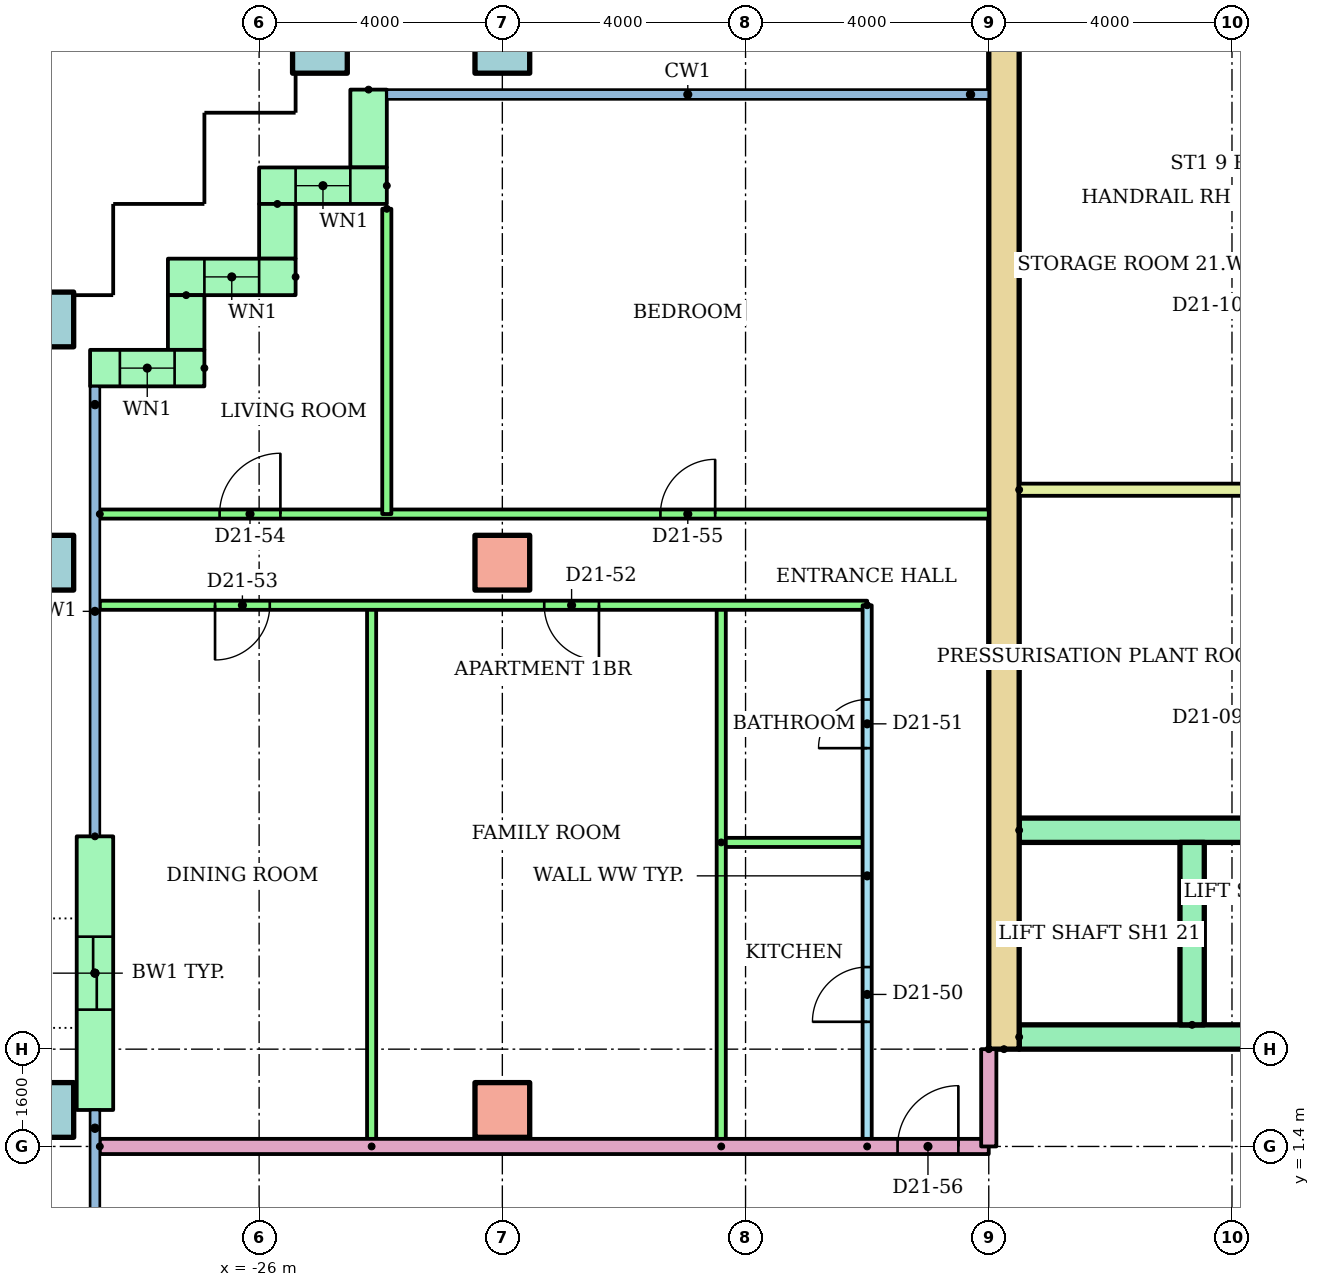
"""IFC4 building model, lengths in metres.
Left out: names, types, materials, properties, quantities, classifications, styles, units other than length and angle.
Written with IfcOpenShell. Run it as: python <this file> out.ifc"""

import sys

from ifc_helpers import new_model, si_unit, direction, frame, frame_2d, origin, origin_2d, place, context, subcontext, project, spatial, rectangle, hollow_rectangle, extrude, element, fill, save


model = new_model("IFC4")
c1 = context("Model", 3, precision=1e-05, world=origin(), true_north=direction((0.0, 1.0)))
c2 = subcontext(c1, "Body", "Model", "MODEL_VIEW")
j1 = project(units=[si_unit("LENGTHUNIT", "METRE"), si_unit("PLANEANGLEUNIT", "RADIAN")], contexts=[c1])
p1 = place(None, origin())
s1 = spatial("IfcSite", under=j1, at=p1, CompositionType="ELEMENT")
p2 = place(p1, origin())
s2 = spatial("IfcBuilding", under=s1, at=p2, CompositionType="ELEMENT")
p3 = place(p2, frame((0.0, 0.0, 83.9)))
s3 = spatial("IfcBuildingStorey", under=s2, at=p3, CompositionType="ELEMENT", Elevation=83.9)
p4 = place(p3, frame((-29.5, 2.0, 0.0)))
e1 = element("IfcColumn", 1, at=p4, inside=s3, PredefinedType="COLUMN", context=c2, shape_type="SweptSolid", body=[
    extrude(hollow_rectangle(XDim=0.9, YDim=0.9, WallThickness=0.045, at=origin_2d()), origin(), (0.0, 0.0, 1.0), 3.2),
])
p5 = place(p3, frame((-22.0, 2.0, 0.0)))
e2 = element("IfcColumn", 2, at=p5, inside=s3, PredefinedType="COLUMN", context=c2, shape_type="SweptSolid", body=[
    extrude(rectangle(XDim=0.9, YDim=0.9, at=origin_2d()), origin(), (0.0, 0.0, 1.0), 3.2),
])
p6 = place(p3, frame((-29.5, 11.0, 0.0)))
e3 = element("IfcColumn", 3, at=p6, inside=s3, PredefinedType="COLUMN", context=c2, shape_type="SweptSolid", body=[
    extrude(hollow_rectangle(XDim=0.9, YDim=0.9, WallThickness=0.045, at=origin_2d()), origin(), (0.0, 0.0, 1.0), 3.2),
])
p7 = place(p3, frame((-22.0, 11.0, 0.0)))
e4 = element("IfcColumn", 4, at=p7, inside=s3, PredefinedType="COLUMN", context=c2, shape_type="SweptSolid", body=[
    extrude(rectangle(XDim=0.9, YDim=0.9, at=origin_2d()), origin(), (0.0, 0.0, 1.0), 3.2),
])
for number, where in (
    (5, (-29.5, 15.0, 0.0)),
    (6, (-25.0, 19.5, 0.0)),
    (7, (-22.0, 19.5, 0.0)),
):
    element("IfcColumn", number, at=place(p3, frame(where)), inside=s3, PredefinedType="COLUMN", context=c2, shape_type="SweptSolid", body=[
        extrude(hollow_rectangle(XDim=0.9, YDim=0.9, WallThickness=0.045, at=origin_2d()), origin(), (0.0, 0.0, 1.0), 3.2),
    ])
p8 = place(p3, frame((-24.2, 18.78, 0.0), z_axis=(0.0, 0.0, 1.0), x_axis=(0.0, -1.0, 0.0)))
e8 = element("IfcWall", 8, at=p8, inside=s3, PredefinedType="STANDARD", context=c2, shape_type="SweptSolid", body=[
    extrude(rectangle(XDim=1.28, YDim=0.6, at=frame_2d((0.64, 0.0))), origin(), (0.0, 0.0, 1.0), 2.92),
])
p9 = place(p3, frame((-23.9, 17.2, 0.0), z_axis=(0.0, 0.0, 1.0), x_axis=(-1.0, 0.0, 0.0)))
e9 = element("IfcWall", 9, at=p9, inside=s3, PredefinedType="STANDARD", context=c2, shape_type="SweptSolid", body=[
    extrude(rectangle(XDim=2.1, YDim=0.6, at=frame_2d((1.05, 0.0))), origin(), (0.0, 0.0, 1.0), 2.92),
])
p10 = place(p9, frame((0.6, 0.0, 0.9)))
e10 = element("IfcOpeningElement", 10, at=p10, cuts=e9, PredefinedType="OPENING", context=c2, shape_type="SweptSolid", body=[
    extrude(rectangle(XDim=0.9, YDim=1.5, at=frame_2d((0.45, 0.75))), frame((0.0, 0.31, 0.0), z_axis=(0.0, -1.0, 0.0), x_axis=(1.0, 0.0, 0.0)), (0.0, 0.0, 1.0), 0.62),
])
p11 = place(p3, frame((-25.7, 16.9, 0.0), z_axis=(0.0, 0.0, 1.0), x_axis=(0.0, -1.0, 0.0)))
e11 = element("IfcWall", 11, at=p11, inside=s3, PredefinedType="STANDARD", context=c2, shape_type="SweptSolid", body=[
    extrude(rectangle(XDim=0.9, YDim=0.6, at=frame_2d((0.45, 0.0))), origin(), (0.0, 0.0, 1.0), 2.92),
])
p12 = place(p3, frame((-25.4, 15.7, 0.0), z_axis=(0.0, 0.0, 1.0), x_axis=(-1.0, 0.0, 0.0)))
e12 = element("IfcWall", 12, at=p12, inside=s3, PredefinedType="STANDARD", context=c2, shape_type="SweptSolid", body=[
    extrude(rectangle(XDim=2.1, YDim=0.6, at=frame_2d((1.05, 0.0))), origin(), (0.0, 0.0, 1.0), 2.92),
])
p13 = place(p12, frame((0.6, 0.0, 0.9)))
e13 = element("IfcOpeningElement", 13, at=p13, cuts=e12, PredefinedType="OPENING", context=c2, shape_type="SweptSolid", body=[
    extrude(rectangle(XDim=0.9, YDim=1.5, at=frame_2d((0.45, 0.75))), frame((0.0, 0.31, 0.0), z_axis=(0.0, -1.0, 0.0), x_axis=(1.0, 0.0, 0.0)), (0.0, 0.0, 1.0), 0.62),
])
p14 = place(p3, frame((-27.2, 15.4, 0.0), z_axis=(0.0, 0.0, 1.0), x_axis=(0.0, -1.0, 0.0)))
e14 = element("IfcWall", 14, at=p14, inside=s3, PredefinedType="STANDARD", context=c2, shape_type="SweptSolid", body=[
    extrude(rectangle(XDim=0.9, YDim=0.6, at=frame_2d((0.45, 0.0))), origin(), (0.0, 0.0, 1.0), 2.92),
])
p15 = place(p3, frame((-26.9, 14.2, 0.0), z_axis=(0.0, 0.0, 1.0), x_axis=(-1.0, 0.0, 0.0)))
e15 = element("IfcWall", 15, at=p15, inside=s3, PredefinedType="STANDARD", context=c2, shape_type="SweptSolid", body=[
    extrude(rectangle(XDim=1.88, YDim=0.6, at=frame_2d((0.94, 0.0))), origin(), (0.0, 0.0, 1.0), 2.92),
])
p16 = place(p15, frame((0.49, 0.0, 0.9)))
e16 = element("IfcOpeningElement", 16, at=p16, cuts=e15, PredefinedType="OPENING", context=c2, shape_type="SweptSolid", body=[
    extrude(rectangle(XDim=0.9, YDim=1.5, at=frame_2d((0.45, 0.75))), frame((0.0, 0.31, 0.0), z_axis=(0.0, -1.0, 0.0), x_axis=(1.0, 0.0, 0.0)), (0.0, 0.0, 1.0), 0.62),
])
p17 = place(p3, frame((-28.7, 6.5, 0.0), z_axis=(0.0, 0.0, 1.0), x_axis=(0.0, -1.0, 0.0)))
e17 = element("IfcWall", 17, at=p17, inside=s3, PredefinedType="STANDARD", context=c2, shape_type="SweptSolid", body=[
    extrude(rectangle(XDim=4.5, YDim=0.6, at=frame_2d((2.25, 0.0))), origin(), (0.0, 0.0, 1.0), 2.92),
])
p18 = place(p17, frame((1.65, 0.0, 0.0)))
e18 = element("IfcOpeningElement", 18, at=p18, cuts=e17, PredefinedType="OPENING", context=c2, shape_type="SweptSolid", body=[
    extrude(rectangle(XDim=1.2, YDim=2.1, at=frame_2d((0.6, 1.05))), frame((0.0, 0.31, 0.0), z_axis=(0.0, -1.0, 0.0), x_axis=(1.0, 0.0, 0.0)), (0.0, 0.0, 1.0), 0.62),
])
p19 = place(p3, frame((-13.75, 3.0, 0.0), z_axis=(0.0, 0.0, 1.0), x_axis=(0.0, 1.0, 0.0)))
e19 = element("IfcWall", 19, at=p19, inside=s3, PredefinedType="SHEAR", context=c2, shape_type="SweptSolid", body=[
    extrude(rectangle(XDim=17.0, YDim=0.5, at=frame_2d((8.5, 0.0))), origin(), (0.0, 0.0, 1.0), 2.92),
])
p20 = place(p3, frame((-13.5, 3.2, 0.0)))
e20 = element("IfcWall", 20, at=p20, inside=s3, PredefinedType="SHEAR", context=c2, shape_type="SweptSolid", body=[
    extrude(rectangle(XDim=27.0, YDim=0.4, at=frame_2d((13.5, 0.0))), origin(), (0.0, 0.0, 1.0), 2.92),
])
p21 = place(p20, frame((6.861, 0.0, 0.0)))
e21 = element("IfcOpeningElement", 21, at=p21, cuts=e20, PredefinedType="OPENING", context=c2, shape_type="SweptSolid", body=[
    extrude(rectangle(XDim=1.1, YDim=2.1, at=frame_2d((0.55, 1.05))), frame((0.0, 0.21, 0.0), z_axis=(0.0, -1.0, 0.0), x_axis=(1.0, 0.0, 0.0)), (0.0, 0.0, 1.0), 0.42),
])
p22 = place(p20, frame((9.906, 0.0, 0.0)))
e22 = element("IfcOpeningElement", 22, at=p22, cuts=e20, PredefinedType="OPENING", context=c2, shape_type="SweptSolid", body=[
    extrude(rectangle(XDim=1.1, YDim=2.1, at=frame_2d((0.55, 1.05))), frame((0.0, 0.21, 0.0), z_axis=(0.0, -1.0, 0.0), x_axis=(1.0, 0.0, 0.0)), (0.0, 0.0, 1.0), 0.42),
])
p23 = place(p20, frame((15.994, 0.0, 0.0)))
e23 = element("IfcOpeningElement", 23, at=p23, cuts=e20, PredefinedType="OPENING", context=c2, shape_type="SweptSolid", body=[
    extrude(rectangle(XDim=1.1, YDim=2.1, at=frame_2d((0.55, 1.05))), frame((0.0, 0.21, 0.0), z_axis=(0.0, -1.0, 0.0), x_axis=(1.0, 0.0, 0.0)), (0.0, 0.0, 1.0), 0.42),
])
p24 = place(p20, frame((19.039, 0.0, 0.0)))
e24 = element("IfcOpeningElement", 24, at=p24, cuts=e20, PredefinedType="OPENING", context=c2, shape_type="SweptSolid", body=[
    extrude(rectangle(XDim=1.1, YDim=2.1, at=frame_2d((0.55, 1.05))), frame((0.0, 0.21, 0.0), z_axis=(0.0, -1.0, 0.0), x_axis=(1.0, 0.0, 0.0)), (0.0, 0.0, 1.0), 0.42),
])
p25 = place(p20, frame((12.6, 0.0, 0.0)))
e25 = element("IfcOpeningElement", 25, at=p25, cuts=e20, PredefinedType="OPENING", context=c2, shape_type="SweptSolid", body=[
    extrude(rectangle(XDim=1.8, YDim=2.1, at=frame_2d((0.9, 1.05))), frame((0.0, 0.21, 0.0), z_axis=(0.0, -1.0, 0.0), x_axis=(1.0, 0.0, 0.0)), (0.0, 0.0, 1.0), 0.42),
])
p26 = place(p3, frame((-13.5, 6.6, 0.0)))
e26 = element("IfcWall", 26, at=p26, inside=s3, PredefinedType="SHEAR", context=c2, shape_type="SweptSolid", body=[
    extrude(rectangle(XDim=11.978, YDim=0.4, at=frame_2d((5.989, 0.0))), origin(), (0.0, 0.0, 1.0), 2.92),
])
p27 = place(p3, frame((-10.656, 3.4, 0.0), z_axis=(0.0, 0.0, 1.0), x_axis=(0.0, 1.0, 0.0)))
e27 = element("IfcWall", 27, at=p27, inside=s3, PredefinedType="SHEAR", context=c2, shape_type="SweptSolid", body=[
    extrude(rectangle(XDim=3.0, YDim=0.4, at=frame_2d((1.5, 0.0))), origin(), (0.0, 0.0, 1.0), 2.92),
])
p28 = place(p3, frame((-13.5, 12.2, 0.0)))
e28 = element("IfcWall", 28, at=p28, inside=s3, PredefinedType="PARTITIONING", context=c2, shape_type="SweptSolid", body=[
    extrude(rectangle(XDim=3.9, YDim=0.2, at=frame_2d((1.95, 0.0))), origin(), (0.0, 0.0, 1.0), 2.92),
])
p29 = place(p3, frame((-16.0, 1.4, 0.0), z_axis=(0.0, 0.0, 1.0), x_axis=(0.0, 1.0, 0.0)))
e29 = element("IfcWall", 29, at=p29, inside=s3, PredefinedType="PARTITIONING", context=c2, shape_type="SweptSolid", body=[
    extrude(rectangle(XDim=8.9, YDim=0.15, at=frame_2d((4.45, 0.0))), origin(), (0.0, 0.0, 1.0), 2.4),
])
p30 = place(p29, frame((2.05, 0.0, 0.0)))
e30 = element("IfcOpeningElement", 30, at=p30, cuts=e29, PredefinedType="OPENING", context=c2, shape_type="SweptSolid", body=[
    extrude(rectangle(XDim=0.9, YDim=2.1, at=frame_2d((0.45, 1.05))), frame((0.0, 0.085, 0.0), z_axis=(0.0, -1.0, 0.0), x_axis=(1.0, 0.0, 0.0)), (0.0, 0.0, 1.0), 0.17),
])
p31 = place(p29, frame((6.55, 0.0, 0.0)))
e31 = element("IfcOpeningElement", 31, at=p31, cuts=e29, PredefinedType="OPENING", context=c2, shape_type="SweptSolid", body=[
    extrude(rectangle(XDim=0.8, YDim=2.1, at=frame_2d((0.4, 1.05))), frame((0.0, 0.085, 0.0), z_axis=(0.0, -1.0, 0.0), x_axis=(1.0, 0.0, 0.0)), (0.0, 0.0, 1.0), 0.17),
])
p32 = place(p3, frame((-18.4, 6.4, 0.0)))
e32 = element("IfcWall", 32, at=p32, inside=s3, PredefinedType="PARTITIONING", context=c2, shape_type="SweptSolid", body=[
    extrude(rectangle(XDim=2.4, YDim=0.15, at=frame_2d((1.2, 0.0))), origin(), (0.0, 0.0, 1.0), 2.4),
])
for number, where, z_axis, x_axis in (
    (33, (-18.4, 1.4, 0.0), (0.0, 0.0, 1.0), (0.0, 1.0, 0.0)),
    (34, (-24.15, 1.4, 0.0), (0.0, 0.0, 1.0), (0.0, 1.0, 0.0)),
):
    element("IfcWall", number, at=place(p3, frame(where, z_axis=z_axis, x_axis=x_axis)), inside=s3, PredefinedType="PARTITIONING", context=c2, shape_type="SweptSolid", body=[
        extrude(rectangle(XDim=8.9, YDim=0.15, at=frame_2d((4.45, 0.0))), origin(), (0.0, 0.0, 1.0), 2.4),
    ])
p33 = place(p3, frame((-16.0, 10.3, 0.0), z_axis=(0.0, 0.0, 1.0), x_axis=(-1.0, 0.0, 0.0)))
e35 = element("IfcWall", 35, at=p33, inside=s3, PredefinedType="PARTITIONING", context=c2, shape_type="SweptSolid", body=[
    extrude(rectangle(XDim=12.62, YDim=0.15, at=frame_2d((6.31, 0.0))), origin(), (0.0, 0.0, 1.0), 2.4),
])
p34 = place(p33, frame((4.411, 0.0, 0.0)))
e36 = element("IfcOpeningElement", 36, at=p34, cuts=e35, PredefinedType="OPENING", context=c2, shape_type="SweptSolid", body=[
    extrude(rectangle(XDim=0.9, YDim=2.1, at=frame_2d((0.45, 1.05))), frame((0.0, 0.085, 0.0), z_axis=(0.0, -1.0, 0.0), x_axis=(1.0, 0.0, 0.0)), (0.0, 0.0, 1.0), 0.17),
])
p35 = place(p33, frame((9.825, 0.0, 0.0)))
e37 = element("IfcOpeningElement", 37, at=p35, cuts=e35, PredefinedType="OPENING", context=c2, shape_type="SweptSolid", body=[
    extrude(rectangle(XDim=0.9, YDim=2.1, at=frame_2d((0.45, 1.05))), frame((0.0, 0.085, 0.0), z_axis=(0.0, -1.0, 0.0), x_axis=(1.0, 0.0, 0.0)), (0.0, 0.0, 1.0), 0.17),
])
p36 = place(p3, frame((-28.62, 11.8, 0.0)))
e38 = element("IfcWall", 38, at=p36, inside=s3, PredefinedType="PARTITIONING", context=c2, shape_type="SweptSolid", body=[
    extrude(rectangle(XDim=14.62, YDim=0.15, at=frame_2d((7.31, 0.0))), origin(), (0.0, 0.0, 1.0), 2.4),
])
p37 = place(p36, frame((1.97, 0.0, 0.0)))
e39 = element("IfcOpeningElement", 39, at=p37, cuts=e38, PredefinedType="OPENING", context=c2, shape_type="SweptSolid", body=[
    extrude(rectangle(XDim=1.0, YDim=2.1, at=frame_2d((0.5, 1.05))), frame((0.0, 0.085, 0.0), z_axis=(0.0, -1.0, 0.0), x_axis=(1.0, 0.0, 0.0)), (0.0, 0.0, 1.0), 0.17),
])
p38 = place(p36, frame((9.22, 0.0, 0.0)))
e40 = element("IfcOpeningElement", 40, at=p38, cuts=e38, PredefinedType="OPENING", context=c2, shape_type="SweptSolid", body=[
    extrude(rectangle(XDim=0.9, YDim=2.1, at=frame_2d((0.45, 1.05))), frame((0.0, 0.085, 0.0), z_axis=(0.0, -1.0, 0.0), x_axis=(1.0, 0.0, 0.0)), (0.0, 0.0, 1.0), 0.17),
])
p39 = place(p3, frame((-23.9, 16.82, 0.0), z_axis=(0.0, 0.0, 1.0), x_axis=(0.0, -1.0, 0.0)))
e41 = element("IfcWall", 41, at=p39, inside=s3, PredefinedType="PARTITIONING", context=c2, shape_type="SweptSolid", body=[
    extrude(rectangle(XDim=5.02, YDim=0.15, at=frame_2d((2.51, 0.0))), origin(), (0.0, 0.0, 1.0), 2.4),
])
p40 = place(p3, frame((-28.62, 1.4, 0.0)))
e42 = element("IfcWall", 42, at=p40, inside=s3, PredefinedType="PARTITIONING", context=c2, shape_type="SweptSolid", body=[
    extrude(rectangle(XDim=14.62, YDim=0.25, at=frame_2d((7.31, 0.0))), origin(), (0.0, 0.0, 1.0), 2.4),
])
p41 = place(p40, frame((13.12, 0.0, 0.0)))
e43 = element("IfcOpeningElement", 43, at=p41, cuts=e42, PredefinedType="OPENING", context=c2, shape_type="SweptSolid", body=[
    extrude(rectangle(XDim=1.0, YDim=2.1, at=frame_2d((0.5, 1.05))), frame((0.0, 0.135, 0.0), z_axis=(0.0, -1.0, 0.0), x_axis=(1.0, 0.0, 0.0)), (0.0, 0.0, 1.0), 0.27),
])
p42 = place(p3, frame((-14.0, 3.0, 0.0), z_axis=(0.0, 0.0, 1.0), x_axis=(0.0, -1.0, 0.0)))
e44 = element("IfcWall", 44, at=p42, inside=s3, PredefinedType="PARTITIONING", context=c2, shape_type="SweptSolid", body=[
    extrude(rectangle(XDim=1.6, YDim=0.25, at=frame_2d((0.8, 0.0))), origin(), (0.0, 0.0, 1.0), 2.4),
])
p43 = place(p10, origin())
e45 = element("IfcWindow", 45, at=p43, inside=s3, PartitioningType="SINGLE_PANEL", PredefinedType="WINDOW", context=c2, shape_type="SweptSolid", body=[
    extrude(rectangle(XDim=0.9, YDim=1.5, at=frame_2d((0.45, 0.75))), frame((0.0, 0.03, 0.0), z_axis=(0.0, -1.0, 0.0), x_axis=(1.0, 0.0, 0.0)), (0.0, 0.0, 1.0), 0.06),
])
fill(e10, e45)
p44 = place(p13, origin())
e46 = element("IfcWindow", 46, at=p44, inside=s3, PartitioningType="SINGLE_PANEL", PredefinedType="WINDOW", context=c2, shape_type="SweptSolid", body=[
    extrude(rectangle(XDim=0.9, YDim=1.5, at=frame_2d((0.45, 0.75))), frame((0.0, 0.03, 0.0), z_axis=(0.0, -1.0, 0.0), x_axis=(1.0, 0.0, 0.0)), (0.0, 0.0, 1.0), 0.06),
])
fill(e13, e46)
p45 = place(p16, origin())
e47 = element("IfcWindow", 47, at=p45, inside=s3, PartitioningType="SINGLE_PANEL", PredefinedType="WINDOW", context=c2, shape_type="SweptSolid", body=[
    extrude(rectangle(XDim=0.9, YDim=1.5, at=frame_2d((0.45, 0.75))), frame((0.0, 0.03, 0.0), z_axis=(0.0, -1.0, 0.0), x_axis=(1.0, 0.0, 0.0)), (0.0, 0.0, 1.0), 0.06),
])
fill(e16, e47)
p46 = place(p30, origin())
e48 = element("IfcDoor", 48, at=p46, inside=s3, OperationType="SINGLE_SWING_LEFT", PredefinedType="DOOR", context=c2, shape_type="SweptSolid", body=[
    extrude(rectangle(XDim=0.9, YDim=2.1, at=frame_2d((0.45, 1.05))), frame((0.0, 0.025, 0.0), z_axis=(0.0, -1.0, 0.0), x_axis=(1.0, 0.0, 0.0)), (0.0, 0.0, 1.0), 0.05),
])
fill(e30, e48)
p47 = place(p31, origin())
e49 = element("IfcDoor", 49, at=p47, inside=s3, OperationType="SINGLE_SWING_LEFT", PredefinedType="DOOR", context=c2, shape_type="SweptSolid", body=[
    extrude(rectangle(XDim=0.8, YDim=2.1, at=frame_2d((0.4, 1.05))), frame((0.0, 0.025, 0.0), z_axis=(0.0, -1.0, 0.0), x_axis=(1.0, 0.0, 0.0)), (0.0, 0.0, 1.0), 0.05),
])
fill(e31, e49)
p48 = place(p34, origin())
e50 = element("IfcDoor", 50, at=p48, inside=s3, OperationType="SINGLE_SWING_LEFT", PredefinedType="DOOR", context=c2, shape_type="SweptSolid", body=[
    extrude(rectangle(XDim=0.9, YDim=2.1, at=frame_2d((0.45, 1.05))), frame((0.0, 0.025, 0.0), z_axis=(0.0, -1.0, 0.0), x_axis=(1.0, 0.0, 0.0)), (0.0, 0.0, 1.0), 0.05),
])
fill(e36, e50)
p49 = place(p35, origin())
e51 = element("IfcDoor", 51, at=p49, inside=s3, OperationType="SINGLE_SWING_RIGHT", PredefinedType="DOOR", context=c2, shape_type="SweptSolid", body=[
    extrude(rectangle(XDim=0.9, YDim=2.1, at=frame_2d((0.45, 1.05))), frame((0.0, 0.025, 0.0), z_axis=(0.0, -1.0, 0.0), x_axis=(1.0, 0.0, 0.0)), (0.0, 0.0, 1.0), 0.05),
])
fill(e37, e51)
p50 = place(p37, origin())
e52 = element("IfcDoor", 52, at=p50, inside=s3, OperationType="SINGLE_SWING_RIGHT", PredefinedType="DOOR", context=c2, shape_type="SweptSolid", body=[
    extrude(rectangle(XDim=1.0, YDim=2.1, at=frame_2d((0.5, 1.05))), frame((0.0, 0.025, 0.0), z_axis=(0.0, -1.0, 0.0), x_axis=(1.0, 0.0, 0.0)), (0.0, 0.0, 1.0), 0.05),
])
fill(e39, e52)
p51 = place(p38, origin())
e53 = element("IfcDoor", 53, at=p51, inside=s3, OperationType="SINGLE_SWING_RIGHT", PredefinedType="DOOR", context=c2, shape_type="SweptSolid", body=[
    extrude(rectangle(XDim=0.9, YDim=2.1, at=frame_2d((0.45, 1.05))), frame((0.0, 0.025, 0.0), z_axis=(0.0, -1.0, 0.0), x_axis=(1.0, 0.0, 0.0)), (0.0, 0.0, 1.0), 0.05),
])
fill(e40, e53)
p52 = place(p41, origin())
e54 = element("IfcDoor", 54, at=p52, inside=s3, OperationType="SINGLE_SWING_RIGHT", PredefinedType="DOOR", context=c2, shape_type="SweptSolid", body=[
    extrude(rectangle(XDim=1.0, YDim=2.1, at=frame_2d((0.5, 1.05))), frame((0.0, 0.025, 0.0), z_axis=(0.0, -1.0, 0.0), x_axis=(1.0, 0.0, 0.0)), (0.0, 0.0, 1.0), 0.05),
])
fill(e43, e54)
p53 = place(p18, origin())
e55 = element("IfcDoor", 55, at=p53, inside=s3, OperationType="SLIDING_TO_LEFT", PredefinedType="DOOR", context=c2, shape_type="SweptSolid", body=[
    extrude(rectangle(XDim=1.2, YDim=2.1, at=frame_2d((0.6, 1.05))), frame((0.0, 0.025, 0.0), z_axis=(0.0, -1.0, 0.0), x_axis=(1.0, 0.0, 0.0)), (0.0, 0.0, 1.0), 0.05),
])
fill(e18, e55)
save(model, sys.argv[1])
